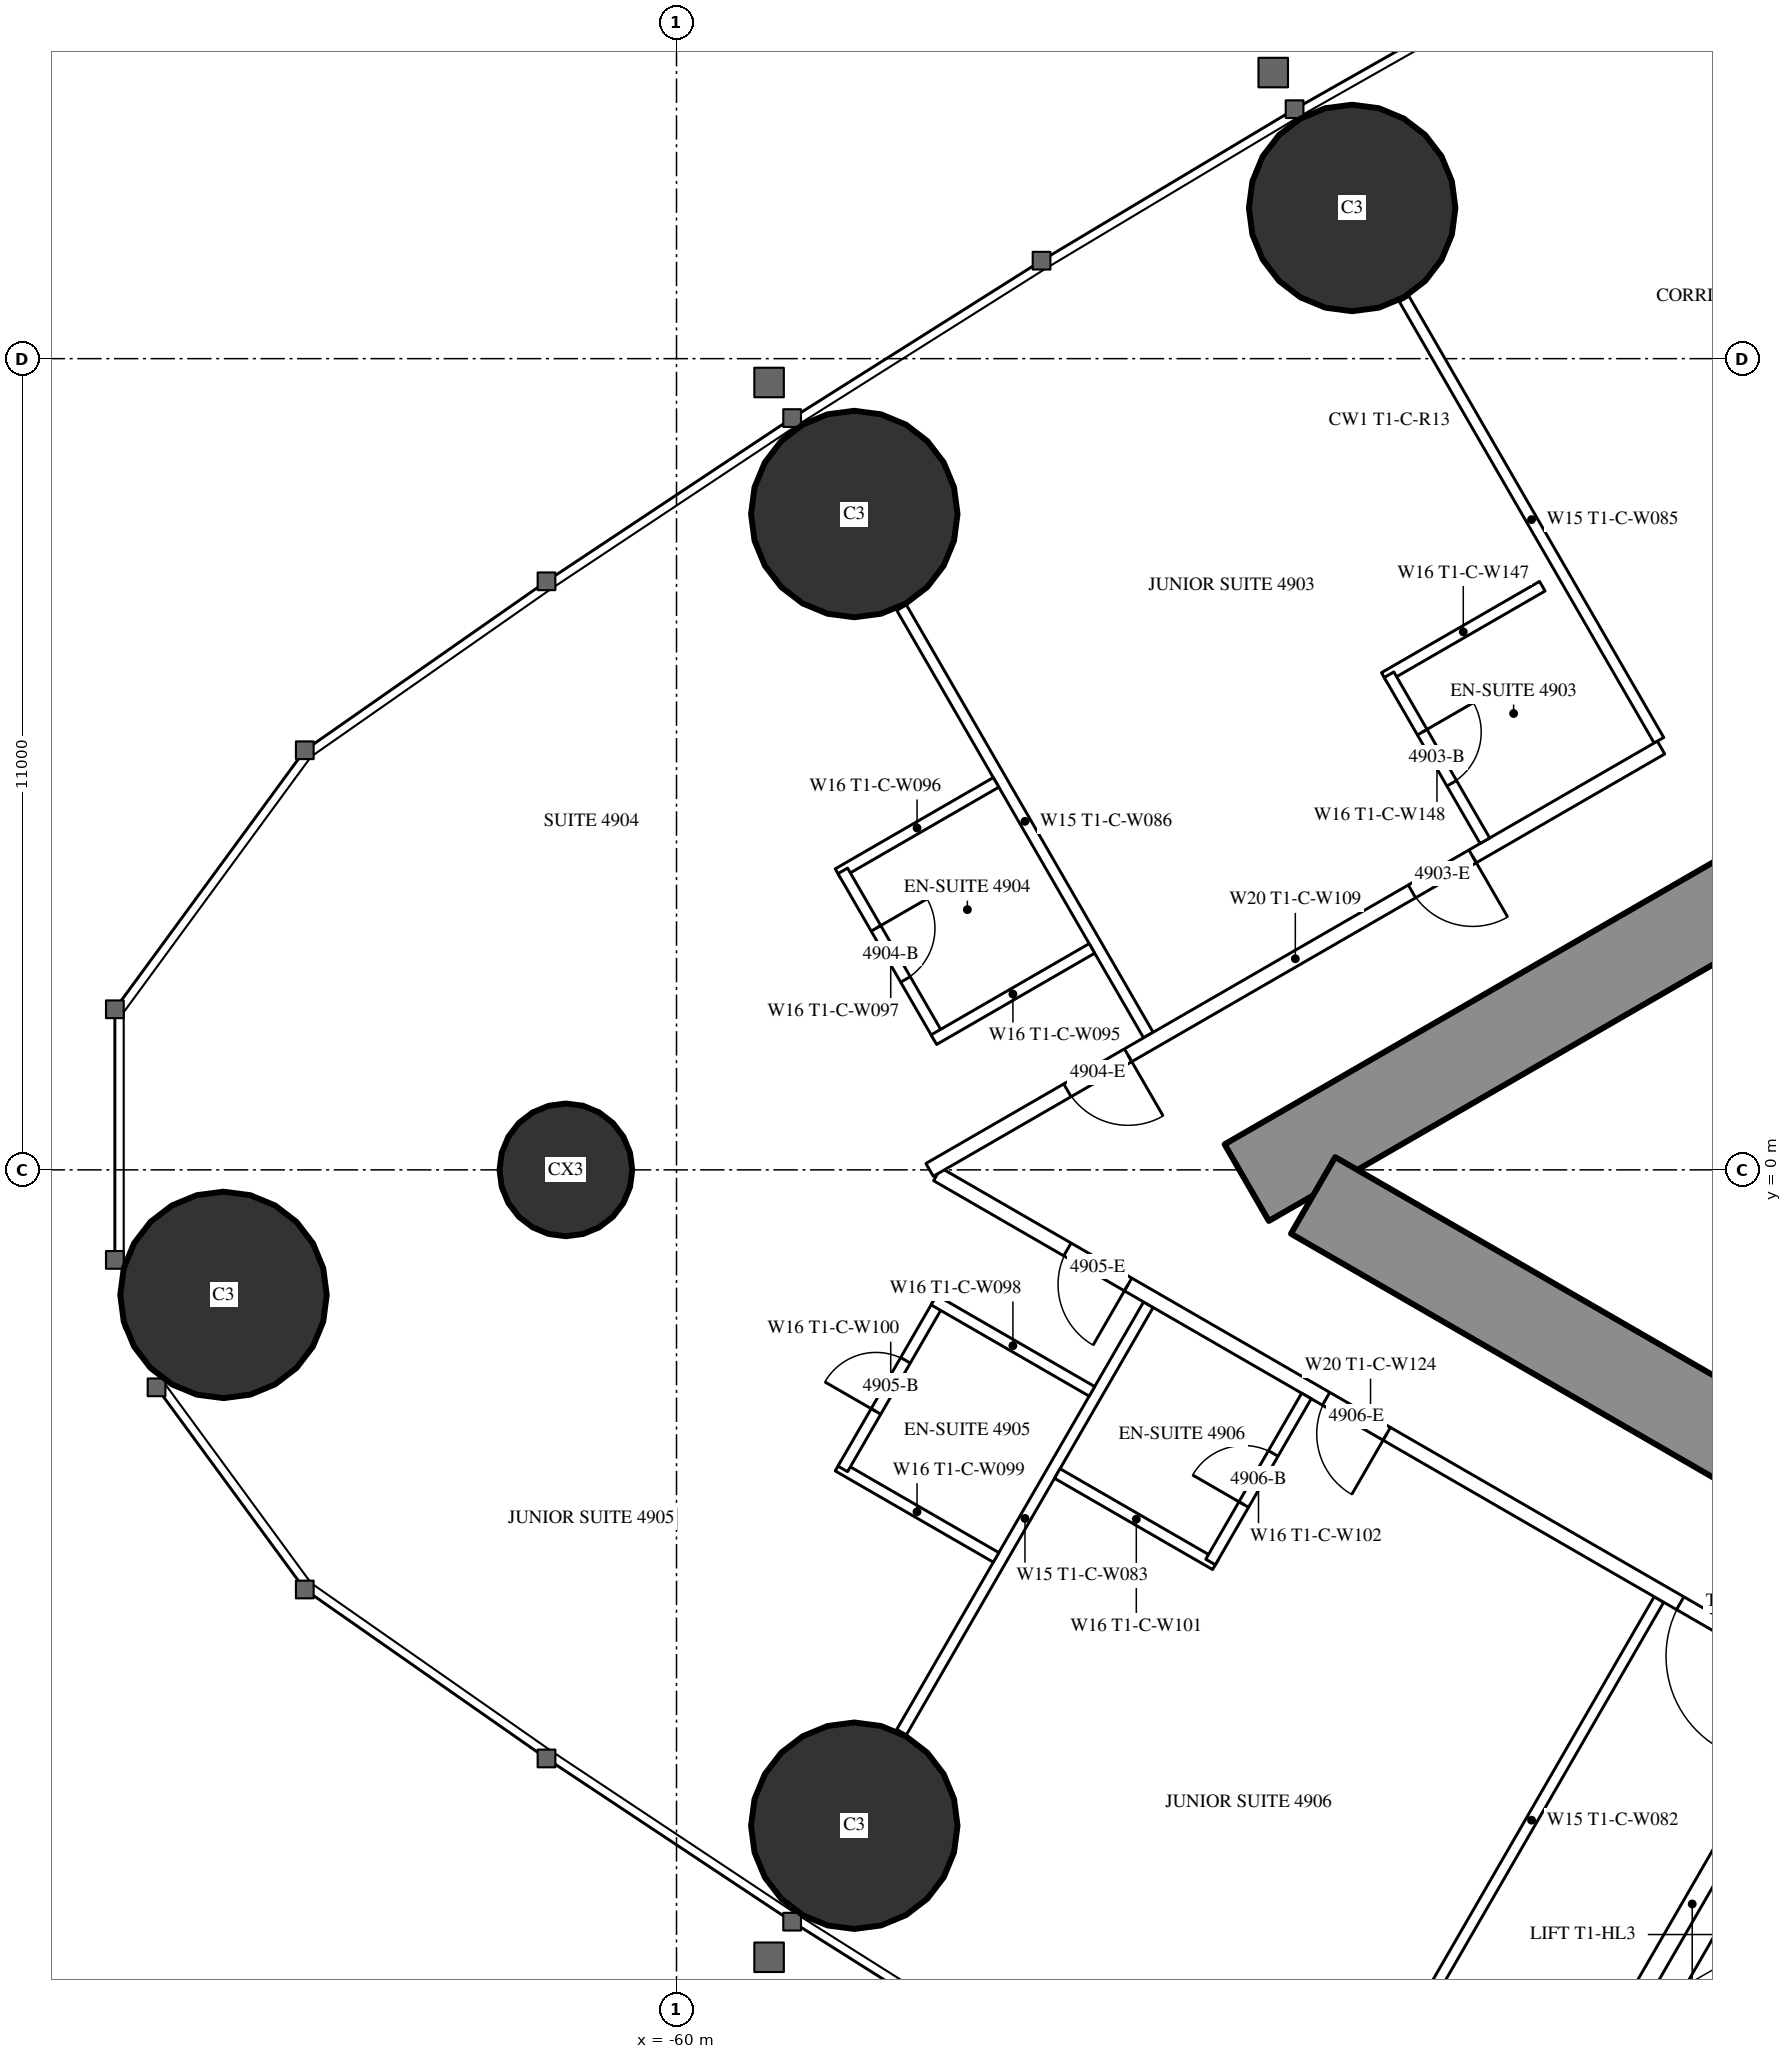
"""IFC4 building model, lengths in metres.
Left out: names, types, materials, properties, quantities, classifications, styles, units other than length and angle.
Written with IfcOpenShell. Run it as: python <this file> out.ifc"""

import sys

from ifc_helpers import new_model, si_unit, direction, frame, frame_2d, origin, origin_2d, place, context, subcontext, project, spatial, rectangle, circle, extrude, element, fill, save


model = new_model("IFC4")
c1 = context("Model", 3, precision=1e-05, world=origin(), true_north=direction((0.0, 1.0)))
c2 = subcontext(c1, "Body", "Model", "MODEL_VIEW")
j1 = project(units=[si_unit("LENGTHUNIT", "METRE"), si_unit("PLANEANGLEUNIT", "RADIAN")], contexts=[c1])
p1 = place(None, origin())
s1 = spatial("IfcSite", under=j1, at=p1, CompositionType="ELEMENT")
p2 = place(p1, origin())
s2 = spatial("IfcBuilding", under=s1, at=p2, CompositionType="ELEMENT")
p3 = place(p2, frame((0.0, 0.0, 184.3)))
s3 = spatial("IfcBuildingStorey", under=s2, at=p3, CompositionType="ELEMENT", Elevation=184.3)
for number, where, z_axis, x_axis in (
    (1, (-66.143, -1.695, 0.0), (0.0, 0.0, 1.0), (1.0, 0.0, 0.0)),
    (2, (-57.59, -8.893, 0.0), (0.0, 0.0, 1.0), (1.0, 0.0, 0.0)),
    (3, (-50.839, 13.043, 0.0), (0.0, 0.0, 1.0), (1.0, 0.0, 0.0)),
    (4, (-57.59, 8.893, 0.0), (0.0, 0.0, 1.0), (1.0, 0.0, 0.0)),
):
    element("IfcColumn", number, at=place(p3, frame(where, z_axis=z_axis, x_axis=x_axis)), inside=s3, PredefinedType="COLUMN", context=c2, shape_type="SweptSolid", body=[
        extrude(circle(Radius=1.4, at=origin_2d()), origin(), (0.0, 0.0, 1.0), 3.5),
    ])
p4 = place(p3, frame((-61.5, 0.0, 0.0), z_axis=(0.0, 0.0, 1.0), x_axis=(1.0, 0.0, 0.0)))
e5 = element("IfcColumn", 5, at=p4, inside=s3, PredefinedType="COLUMN", context=c2, shape_type="SweptSolid", body=[
    extrude(circle(Radius=0.9, at=origin_2d()), origin(), (0.0, 0.0, 1.0), 3.5),
])
p5 = place(p3, frame((-27.2, 14.3, 0.0), z_axis=(0.0, 0.0, 1.0), x_axis=(-0.866026593062, -0.499997940104, 0.0)))
e6 = element("IfcWall", 6, at=p5, inside=s3, PredefinedType="SHEAR", context=c2, shape_type="SweptSolid", body=[
    extrude(rectangle(XDim=28.946, YDim=1.2, at=frame_2d((14.473, 0.0))), origin(), (0.0, 0.0, 1.0), 3.5),
])
p6 = place(p5, frame((4.6, 0.0, 0.0)))
e7 = element("IfcOpeningElement", 7, at=p6, cuts=e6, PredefinedType="OPENING", context=c2, shape_type="SweptSolid", body=[
    extrude(rectangle(XDim=1.0, YDim=2.2, at=frame_2d((0.5, 1.1))), frame((0.0, 0.61, 0.0), z_axis=(0.0, -1.0, 0.0), x_axis=(1.0, 0.0, 0.0)), (0.0, 0.0, 1.0), 1.22),
])
p7 = place(p5, frame((13.395, 0.0, 0.0)))
e8 = element("IfcOpeningElement", 8, at=p7, cuts=e6, PredefinedType="OPENING", context=c2, shape_type="SweptSolid", body=[
    extrude(rectangle(XDim=1.8, YDim=2.2, at=frame_2d((0.9, 1.1))), frame((0.0, 0.61, 0.0), z_axis=(0.0, -1.0, 0.0), x_axis=(1.0, 0.0, 0.0)), (0.0, 0.0, 1.0), 1.22),
])
p8 = place(p3, frame((-27.2, -14.3, 0.0), z_axis=(0.0, 0.0, 1.0), x_axis=(-0.866024021859, 0.500002393557, 0.0)))
e9 = element("IfcWall", 9, at=p8, inside=s3, PredefinedType="SHEAR", context=c2, shape_type="SweptSolid", body=[
    extrude(rectangle(XDim=27.907, YDim=1.2, at=frame_2d((13.954, 0.0))), origin(), (0.0, 0.0, 1.0), 3.5),
])
p9 = place(p8, frame((4.6, 0.0, 0.0)))
e10 = element("IfcOpeningElement", 10, at=p9, cuts=e9, PredefinedType="OPENING", context=c2, shape_type="SweptSolid", body=[
    extrude(rectangle(XDim=1.0, YDim=2.2, at=frame_2d((0.5, 1.1))), frame((0.0, 0.61, 0.0), z_axis=(0.0, -1.0, 0.0), x_axis=(1.0, 0.0, 0.0)), (0.0, 0.0, 1.0), 1.22),
])
p10 = place(p8, frame((13.395, 0.0, 0.0)))
e11 = element("IfcOpeningElement", 11, at=p10, cuts=e9, PredefinedType="OPENING", context=c2, shape_type="SweptSolid", body=[
    extrude(rectangle(XDim=1.8, YDim=2.2, at=frame_2d((0.9, 1.1))), frame((0.0, 0.61, 0.0), z_axis=(0.0, -1.0, 0.0), x_axis=(1.0, 0.0, 0.0)), (0.0, 0.0, 1.0), 1.22),
])
p11 = place(p3, frame((-46.679, 5.825, 0.0), z_axis=(0.0, 0.0, 1.0), x_axis=(-0.500006839597, 0.866021454905, 0.0)))
e12 = element("IfcWall", 12, at=p11, inside=s3, PredefinedType="PARTITIONING", context=c2, shape_type="SweptSolid", body=[
    extrude(rectangle(XDim=6.911, YDim=0.15, at=frame_2d((3.456, 0.0))), origin(), (0.0, 0.0, 1.0), 2.3),
])
p12 = place(p3, frame((-53.602, 1.828, 0.0), z_axis=(0.0, 0.0, 1.0), x_axis=(-0.49999191814, 0.866030069798, 0.0)))
e13 = element("IfcWall", 13, at=p12, inside=s3, PredefinedType="PARTITIONING", context=c2, shape_type="SweptSolid", body=[
    extrude(rectangle(XDim=6.692, YDim=0.15, at=frame_2d((3.346, 0.0))), origin(), (0.0, 0.0, 1.0), 2.3),
])
p13 = place(p3, frame((-46.679, -5.825, 0.0), z_axis=(0.0, 0.0, 1.0), x_axis=(-0.500006839597, -0.866021454905, 0.0)))
e14 = element("IfcWall", 14, at=p13, inside=s3, PredefinedType="PARTITIONING", context=c2, shape_type="SweptSolid", body=[
    extrude(rectangle(XDim=6.911, YDim=0.15, at=frame_2d((3.456, 0.0))), origin(), (0.0, 0.0, 1.0), 2.3),
])
p14 = place(p3, frame((-53.602, -1.828, 0.0), z_axis=(0.0, 0.0, 1.0), x_axis=(-0.49999191814, -0.866030069798, 0.0)))
e15 = element("IfcWall", 15, at=p14, inside=s3, PredefinedType="PARTITIONING", context=c2, shape_type="SweptSolid", body=[
    extrude(rectangle(XDim=6.692, YDim=0.15, at=frame_2d((3.346, 0.0))), origin(), (0.0, 0.0, 1.0), 2.3),
])
p15 = place(p3, frame((-44.715, -6.844, 0.0), z_axis=(0.0, 0.0, 1.0), x_axis=(-0.866025261224, 0.500000246922, 0.0)))
e16 = element("IfcWall", 16, at=p15, inside=s3, PredefinedType="PARTITIONING", context=c2, shape_type="SweptSolid", body=[
    extrude(rectangle(XDim=13.567, YDim=0.2, at=frame_2d((6.783, 0.0))), origin(), (0.0, 0.0, 1.0), 3.25),
])
p16 = place(p15, frame((10.579, 0.0, 0.0)))
e17 = element("IfcOpeningElement", 17, at=p16, cuts=e16, PredefinedType="OPENING", context=c2, shape_type="SweptSolid", body=[
    extrude(rectangle(XDim=0.95, YDim=2.2, at=frame_2d((0.475, 1.1))), frame((0.0, 0.11, 0.0), z_axis=(0.0, -1.0, 0.0), x_axis=(1.0, 0.0, 0.0)), (0.0, 0.0, 1.0), 0.22),
])
p17 = place(p15, frame((6.529, 0.0, 0.0)))
e18 = element("IfcOpeningElement", 18, at=p17, cuts=e16, PredefinedType="OPENING", context=c2, shape_type="SweptSolid", body=[
    extrude(rectangle(XDim=0.95, YDim=2.2, at=frame_2d((0.475, 1.1))), frame((0.0, 0.11, 0.0), z_axis=(0.0, -1.0, 0.0), x_axis=(1.0, 0.0, 0.0)), (0.0, 0.0, 1.0), 0.22),
])
p18 = place(p15, frame((0.5, 0.0, 0.0)))
e19 = element("IfcOpeningElement", 19, at=p18, cuts=e16, PredefinedType="OPENING", context=c2, shape_type="SweptSolid", body=[
    extrude(rectangle(XDim=1.435, YDim=2.2, at=frame_2d((0.718, 1.1))), frame((0.0, 0.11, 0.0), z_axis=(0.0, -1.0, 0.0), x_axis=(1.0, 0.0, 0.0)), (0.0, 0.0, 1.0), 0.22),
])
p19 = place(p3, frame((-46.65, 5.726, 0.0), z_axis=(0.0, 0.0, 1.0), x_axis=(-0.866027963864, -0.499995565786, 0.0)))
e20 = element("IfcWall", 20, at=p19, inside=s3, PredefinedType="PARTITIONING", context=c2, shape_type="SweptSolid", body=[
    extrude(rectangle(XDim=11.452, YDim=0.2, at=frame_2d((5.726, 0.0))), origin(), (0.0, 0.0, 1.0), 3.25),
])
p20 = place(p19, frame((2.95, 0.0, 0.0)))
e21 = element("IfcOpeningElement", 21, at=p20, cuts=e20, PredefinedType="OPENING", context=c2, shape_type="SweptSolid", body=[
    extrude(rectangle(XDim=0.95, YDim=2.2, at=frame_2d((0.475, 1.1))), frame((0.0, 0.11, 0.0), z_axis=(0.0, -1.0, 0.0), x_axis=(1.0, 0.0, 0.0)), (0.0, 0.0, 1.0), 0.22),
])
p21 = place(p19, frame((8.344, 0.0, 0.0)))
e22 = element("IfcOpeningElement", 22, at=p21, cuts=e20, PredefinedType="OPENING", context=c2, shape_type="SweptSolid", body=[
    extrude(rectangle(XDim=0.95, YDim=2.2, at=frame_2d((0.475, 1.1))), frame((0.0, 0.11, 0.0), z_axis=(0.0, -1.0, 0.0), x_axis=(1.0, 0.0, 0.0)), (0.0, 0.0, 1.0), 0.22),
])
p22 = place(p3, frame((-48.26, 7.914, 0.0), z_axis=(0.0, 0.0, 1.0), x_axis=(-0.866031185235, -0.4999899861, 0.0)))
e23 = element("IfcWall", 23, at=p22, inside=s3, PredefinedType="PARTITIONING", context=c2, shape_type="SweptSolid", body=[
    extrude(rectangle(XDim=2.475, YDim=0.15, at=frame_2d((1.238, 0.0))), origin(), (0.0, 0.0, 1.0), 3.25),
])
p23 = place(p3, frame((-49.039, 4.463, 0.0), z_axis=(0.0, 0.0, 1.0), x_axis=(-0.499936506574, 0.866062058628, 0.0)))
e24 = element("IfcWall", 24, at=p23, inside=s3, PredefinedType="PARTITIONING", context=c2, shape_type="SweptSolid", body=[
    extrude(rectangle(XDim=2.6, YDim=0.15, at=frame_2d((1.3, 0.0))), origin(), (0.0, 0.0, 1.0), 3.25),
])
p24 = place(p23, frame((0.9, 0.0, 0.0)))
e25 = element("IfcOpeningElement", 25, at=p24, cuts=e24, PredefinedType="OPENING", context=c2, shape_type="SweptSolid", body=[
    extrude(rectangle(XDim=0.8, YDim=2.2, at=frame_2d((0.4, 1.1))), frame((0.0, 0.085, 0.0), z_axis=(0.0, -1.0, 0.0), x_axis=(1.0, 0.0, 0.0)), (0.0, 0.0, 1.0), 0.17),
])
p25 = place(p3, frame((-55.667, 5.255, 0.0), z_axis=(0.0, 0.0, 1.0), x_axis=(-0.866006523861, -0.500032699561, 0.0)))
e26 = element("IfcWall", 26, at=p25, inside=s3, PredefinedType="PARTITIONING", context=c2, shape_type="SweptSolid", body=[
    extrude(rectangle(XDim=2.475, YDim=0.15, at=frame_2d((1.237, 0.0))), origin(), (0.0, 0.0, 1.0), 3.25),
])
p26 = place(p3, frame((-56.446, 1.803, 0.0), z_axis=(0.0, 0.0, 1.0), x_axis=(-0.499936506574, 0.866062058628, 0.0)))
e27 = element("IfcWall", 27, at=p26, inside=s3, PredefinedType="PARTITIONING", context=c2, shape_type="SweptSolid", body=[
    extrude(rectangle(XDim=2.6, YDim=0.15, at=frame_2d((1.3, 0.0))), origin(), (0.0, 0.0, 1.0), 3.25),
])
p27 = place(p26, frame((0.9, 0.0, 0.0)))
e28 = element("IfcOpeningElement", 28, at=p27, cuts=e27, PredefinedType="OPENING", context=c2, shape_type="SweptSolid", body=[
    extrude(rectangle(XDim=0.8, YDim=2.2, at=frame_2d((0.4, 1.1))), frame((0.0, 0.085, 0.0), z_axis=(0.0, -1.0, 0.0), x_axis=(1.0, 0.0, 0.0)), (0.0, 0.0, 1.0), 0.17),
])
p28 = place(p3, frame((-54.367, 3.003, 0.0), z_axis=(0.0, 0.0, 1.0), x_axis=(-0.866031185235, -0.4999899861, 0.0)))
e29 = element("IfcWall", 29, at=p28, inside=s3, PredefinedType="PARTITIONING", context=c2, shape_type="SweptSolid", body=[
    extrude(rectangle(XDim=2.475, YDim=0.15, at=frame_2d((1.238, 0.0))), origin(), (0.0, 0.0, 1.0), 3.25),
])
p29 = place(p3, frame((-55.667, -5.255, 0.0), z_axis=(0.0, 0.0, 1.0), x_axis=(-0.866006523861, 0.500032699561, 0.0)))
e30 = element("IfcWall", 30, at=p29, inside=s3, PredefinedType="PARTITIONING", context=c2, shape_type="SweptSolid", body=[
    extrude(rectangle(XDim=2.475, YDim=0.15, at=frame_2d((1.237, 0.0))), origin(), (0.0, 0.0, 1.0), 3.25),
])
p30 = place(p3, frame((-56.446, -1.803, 0.0), z_axis=(0.0, 0.0, 1.0), x_axis=(-0.499936506574, -0.866062058628, 0.0)))
e31 = element("IfcWall", 31, at=p30, inside=s3, PredefinedType="PARTITIONING", context=c2, shape_type="SweptSolid", body=[
    extrude(rectangle(XDim=2.6, YDim=0.15, at=frame_2d((1.3, 0.0))), origin(), (0.0, 0.0, 1.0), 3.25),
])
p31 = place(p30, frame((0.9, 0.0, 0.0)))
e32 = element("IfcOpeningElement", 32, at=p31, cuts=e31, PredefinedType="OPENING", context=c2, shape_type="SweptSolid", body=[
    extrude(rectangle(XDim=0.8, YDim=2.2, at=frame_2d((0.4, 1.1))), frame((0.0, 0.085, 0.0), z_axis=(0.0, -1.0, 0.0), x_axis=(1.0, 0.0, 0.0)), (0.0, 0.0, 1.0), 0.17),
])
for number, where, z_axis, x_axis in (
    (33, (-54.367, -3.003, 0.0), (0.0, 0.0, 1.0), (-0.866, 0.5, 0.0)),
    (34, (-52.694, -5.355, 0.0), (0.0, 0.0, 1.0), (-0.866, 0.5, 0.0)),
):
    element("IfcWall", number, at=place(p3, frame(where, z_axis=z_axis, x_axis=x_axis)), inside=s3, PredefinedType="PARTITIONING", context=c2, shape_type="SweptSolid", body=[
        extrude(rectangle(XDim=2.475, YDim=0.15, at=frame_2d((1.238, 0.0))), origin(), (0.0, 0.0, 1.0), 3.25),
    ])
p32 = place(p3, frame((-51.459, -3.065, 0.0), z_axis=(0.0, 0.0, 1.0), x_axis=(-0.499936506574, -0.866062058628, 0.0)))
e35 = element("IfcWall", 35, at=p32, inside=s3, PredefinedType="PARTITIONING", context=c2, shape_type="SweptSolid", body=[
    extrude(rectangle(XDim=2.6, YDim=0.15, at=frame_2d((1.3, 0.0))), origin(), (0.0, 0.0, 1.0), 3.25),
])
p33 = place(p32, frame((0.9, 0.0, 0.0)))
e36 = element("IfcOpeningElement", 36, at=p33, cuts=e35, PredefinedType="OPENING", context=c2, shape_type="SweptSolid", body=[
    extrude(rectangle(XDim=0.8, YDim=2.2, at=frame_2d((0.4, 1.1))), frame((0.0, 0.085, 0.0), z_axis=(0.0, -1.0, 0.0), x_axis=(1.0, 0.0, 0.0)), (0.0, 0.0, 1.0), 0.17),
])
p34 = place(p3, frame((-45.428, -8.568, 0.0), z_axis=(0.0, 0.0, 1.0), x_axis=(-0.499929347863, -0.866066190972, 0.0)))
e37 = element("IfcWall", 37, at=p34, inside=s3, PredefinedType="PARTITIONING", context=c2, shape_type="SweptSolid", body=[
    extrude(rectangle(XDim=3.201, YDim=0.25, at=frame_2d((1.6, 0.0))), origin(), (0.0, 0.0, 1.0), 3.25),
])
p35 = place(p24, origin())
e38 = element("IfcDoor", 38, at=p35, inside=s3, OperationType="SINGLE_SWING_RIGHT", PredefinedType="DOOR", context=c2, shape_type="SweptSolid", body=[
    extrude(rectangle(XDim=0.8, YDim=2.2, at=frame_2d((0.4, 1.1))), frame((0.0, 0.025, 0.0), z_axis=(0.0, -1.0, 0.0), x_axis=(1.0, 0.0, 0.0)), (0.0, 0.0, 1.0), 0.05),
])
fill(e25, e38)
p36 = place(p20, origin())
e39 = element("IfcDoor", 39, at=p36, inside=s3, OperationType="SINGLE_SWING_LEFT", PredefinedType="DOOR", context=c2, shape_type="SweptSolid", body=[
    extrude(rectangle(XDim=0.95, YDim=2.2, at=frame_2d((0.475, 1.1))), frame((0.0, 0.025, 0.0), z_axis=(0.0, -1.0, 0.0), x_axis=(1.0, 0.0, 0.0)), (0.0, 0.0, 1.0), 0.05),
])
fill(e21, e39)
p37 = place(p27, origin())
e40 = element("IfcDoor", 40, at=p37, inside=s3, OperationType="SINGLE_SWING_RIGHT", PredefinedType="DOOR", context=c2, shape_type="SweptSolid", body=[
    extrude(rectangle(XDim=0.8, YDim=2.2, at=frame_2d((0.4, 1.1))), frame((0.0, 0.025, 0.0), z_axis=(0.0, -1.0, 0.0), x_axis=(1.0, 0.0, 0.0)), (0.0, 0.0, 1.0), 0.05),
])
fill(e28, e40)
p38 = place(p21, origin())
e41 = element("IfcDoor", 41, at=p38, inside=s3, OperationType="SINGLE_SWING_LEFT", PredefinedType="DOOR", context=c2, shape_type="SweptSolid", body=[
    extrude(rectangle(XDim=0.95, YDim=2.2, at=frame_2d((0.475, 1.1))), frame((0.0, 0.025, 0.0), z_axis=(0.0, -1.0, 0.0), x_axis=(1.0, 0.0, 0.0)), (0.0, 0.0, 1.0), 0.05),
])
fill(e22, e41)
p39 = place(p31, origin())
e42 = element("IfcDoor", 42, at=p39, inside=s3, OperationType="SINGLE_SWING_RIGHT", PredefinedType="DOOR", context=c2, shape_type="SweptSolid", body=[
    extrude(rectangle(XDim=0.8, YDim=2.2, at=frame_2d((0.4, 1.1))), frame((0.0, 0.025, 0.0), z_axis=(0.0, -1.0, 0.0), x_axis=(1.0, 0.0, 0.0)), (0.0, 0.0, 1.0), 0.05),
])
fill(e32, e42)
p40 = place(p16, origin())
e43 = element("IfcDoor", 43, at=p40, inside=s3, OperationType="SINGLE_SWING_LEFT", PredefinedType="DOOR", context=c2, shape_type="SweptSolid", body=[
    extrude(rectangle(XDim=0.95, YDim=2.2, at=frame_2d((0.475, 1.1))), frame((0.0, 0.025, 0.0), z_axis=(0.0, -1.0, 0.0), x_axis=(1.0, 0.0, 0.0)), (0.0, 0.0, 1.0), 0.05),
])
fill(e17, e43)
p41 = place(p33, origin())
e44 = element("IfcDoor", 44, at=p41, inside=s3, OperationType="SINGLE_SWING_RIGHT", PredefinedType="DOOR", context=c2, shape_type="SweptSolid", body=[
    extrude(rectangle(XDim=0.8, YDim=2.2, at=frame_2d((0.4, 1.1))), frame((0.0, 0.025, 0.0), z_axis=(0.0, -1.0, 0.0), x_axis=(1.0, 0.0, 0.0)), (0.0, 0.0, 1.0), 0.05),
])
fill(e36, e44)
p42 = place(p17, origin())
e45 = element("IfcDoor", 45, at=p42, inside=s3, OperationType="SINGLE_SWING_LEFT", PredefinedType="DOOR", context=c2, shape_type="SweptSolid", body=[
    extrude(rectangle(XDim=0.95, YDim=2.2, at=frame_2d((0.475, 1.1))), frame((0.0, 0.025, 0.0), z_axis=(0.0, -1.0, 0.0), x_axis=(1.0, 0.0, 0.0)), (0.0, 0.0, 1.0), 0.05),
])
fill(e18, e45)
p43 = place(p18, origin())
e46 = element("IfcDoor", 46, at=p43, inside=s3, OperationType="SINGLE_SWING_LEFT", PredefinedType="DOOR", context=c2, shape_type="SweptSolid", body=[
    extrude(rectangle(XDim=1.435, YDim=2.2, at=frame_2d((0.718, 1.1))), frame((0.0, 0.025, 0.0), z_axis=(0.0, -1.0, 0.0), x_axis=(1.0, 0.0, 0.0)), (0.0, 0.0, 1.0), 0.05),
])
fill(e19, e46)
save(model, sys.argv[1])
